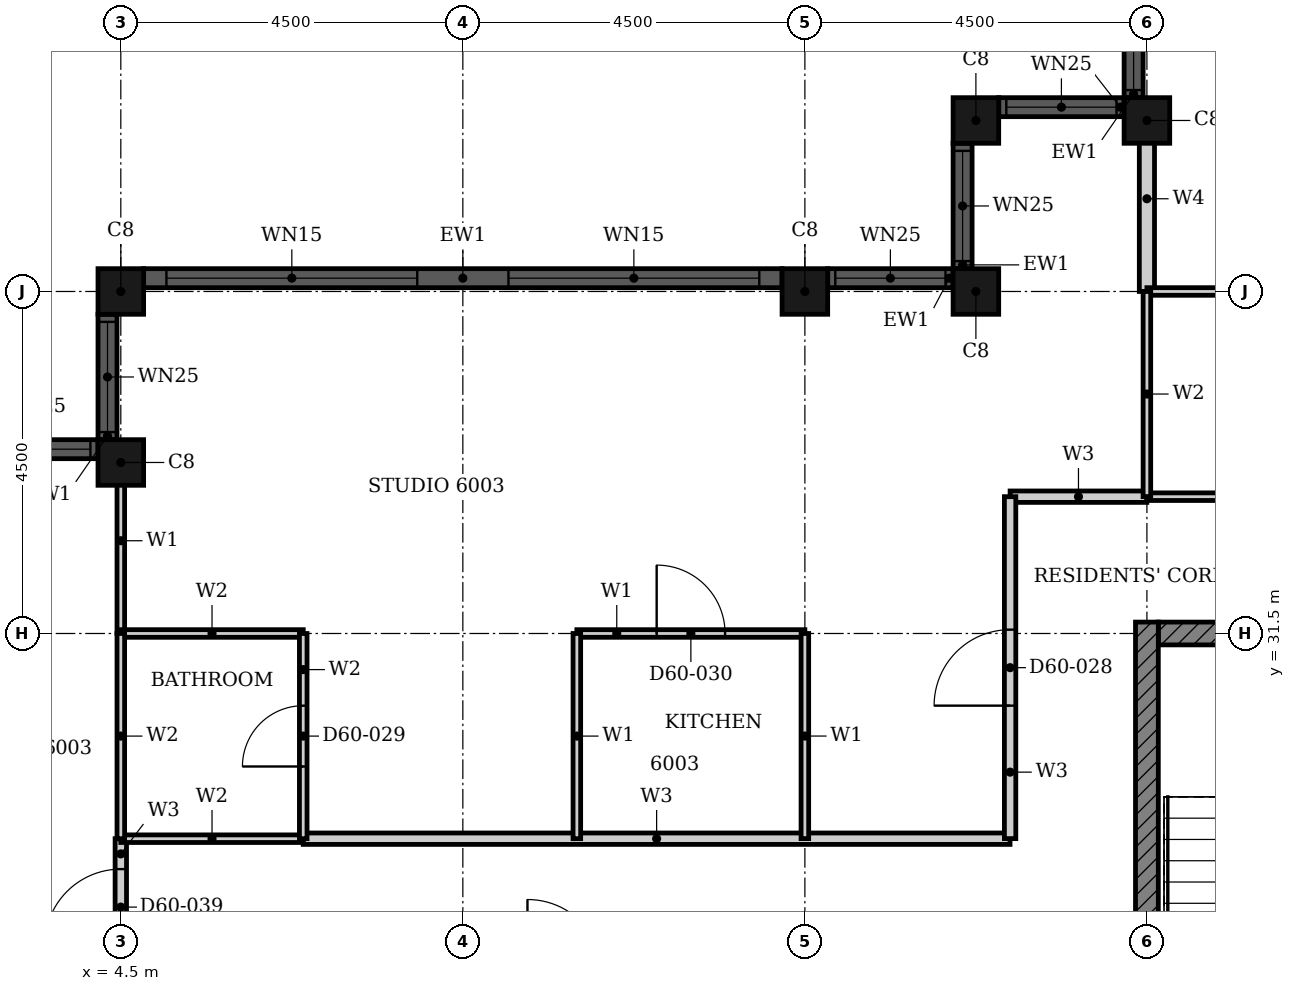
"""IFC4 building model, lengths in metres.
Left out: names, types, materials, properties, quantities, classifications, styles, units other than length and angle.
Written with IfcOpenShell. Run it as: python <this file> out.ifc"""

import sys

from ifc_helpers import new_model, si_unit, direction, frame, frame_2d, origin, origin_2d, place, context, subcontext, project, spatial, rectangle, hollow_rectangle, extrude, element, fill, save


model = new_model("IFC4")
c1 = context("Model", 3, precision=1e-05, world=origin(), true_north=direction((0.0, 1.0)))
c2 = subcontext(c1, "Body", "Model", "MODEL_VIEW")
j1 = project(units=[si_unit("LENGTHUNIT", "METRE"), si_unit("PLANEANGLEUNIT", "RADIAN")], contexts=[c1])
p1 = place(None, origin())
s1 = spatial("IfcSite", under=j1, at=p1, CompositionType="ELEMENT")
p2 = place(p1, origin())
s2 = spatial("IfcBuilding", under=s1, at=p2, CompositionType="ELEMENT")
p3 = place(p2, frame((0.0, 0.0, 237.9)))
s3 = spatial("IfcBuildingStorey", under=s2, at=p3, CompositionType="ELEMENT", Elevation=237.9)
for number, where, z_axis, x_axis in (
    (1, (18.0, 38.25, 0.0), (0.0, 0.0, 1.0), (1.0, 0.0, 0.0)),
    (2, (15.75, 38.25, 0.0), (0.0, 0.0, 1.0), (1.0, 0.0, 0.0)),
    (3, (15.75, 36.0, 0.0), (0.0, 0.0, 1.0), (1.0, 0.0, 0.0)),
    (4, (13.5, 36.0, 0.0), (0.0, 0.0, 1.0), (1.0, 0.0, 0.0)),
    (5, (4.5, 36.0, 0.0), (0.0, 0.0, 1.0), (1.0, 0.0, 0.0)),
    (6, (4.5, 33.75, 0.0), (0.0, 0.0, 1.0), (1.0, 0.0, 0.0)),
):
    element("IfcColumn", number, at=place(p3, frame(where, z_axis=z_axis, x_axis=x_axis)), inside=s3, PredefinedType="COLUMN", context=c2, shape_type="SweptSolid", body=[
        extrude(hollow_rectangle(XDim=0.6, YDim=0.6, WallThickness=0.02, at=origin_2d()), origin(), (0.0, 0.0, 1.0), 3.7),
    ])
p4 = place(p3, frame((17.825, 40.2, 0.0), z_axis=(0.0, 0.0, 1.0), x_axis=(0.0, -1.0, 0.0)))
e7 = element("IfcWall", 7, at=p4, inside=s3, PredefinedType="SOLIDWALL", context=c2, shape_type="SweptSolid", body=[
    extrude(rectangle(XDim=1.65, YDim=0.25, at=frame_2d((0.825, 0.0))), origin(), (0.0, 0.0, 1.0), 3.7),
])
p5 = place(p4, frame((0.1, 0.0, 0.9)))
e8 = element("IfcOpeningElement", 8, at=p5, cuts=e7, PredefinedType="OPENING", context=c2, shape_type="SweptSolid", body=[
    extrude(rectangle(XDim=1.45, YDim=1.85, at=frame_2d((0.725, 0.925))), frame((0.0, 0.135, 0.0), z_axis=(0.0, -1.0, 0.0), x_axis=(1.0, 0.0, 0.0)), (0.0, 0.0, 1.0), 0.27),
])
p6 = place(p3, frame((17.7, 38.425, 0.0), z_axis=(0.0, 0.0, 1.0), x_axis=(-1.0, 0.0, 0.0)))
e9 = element("IfcWall", 9, at=p6, inside=s3, PredefinedType="SOLIDWALL", context=c2, shape_type="SweptSolid", body=[
    extrude(rectangle(XDim=1.65, YDim=0.25, at=frame_2d((0.825, 0.0))), origin(), (0.0, 0.0, 1.0), 3.7),
])
p7 = place(p6, frame((0.1, 0.0, 0.9)))
e10 = element("IfcOpeningElement", 10, at=p7, cuts=e9, PredefinedType="OPENING", context=c2, shape_type="SweptSolid", body=[
    extrude(rectangle(XDim=1.45, YDim=1.85, at=frame_2d((0.725, 0.925))), frame((0.0, 0.135, 0.0), z_axis=(0.0, -1.0, 0.0), x_axis=(1.0, 0.0, 0.0)), (0.0, 0.0, 1.0), 0.27),
])
p8 = place(p3, frame((15.575, 37.95, 0.0), z_axis=(0.0, 0.0, 1.0), x_axis=(0.0, -1.0, 0.0)))
e11 = element("IfcWall", 11, at=p8, inside=s3, PredefinedType="SOLIDWALL", context=c2, shape_type="SweptSolid", body=[
    extrude(rectangle(XDim=1.65, YDim=0.25, at=frame_2d((0.825, 0.0))), origin(), (0.0, 0.0, 1.0), 3.7),
])
p9 = place(p8, frame((0.1, 0.0, 0.9)))
e12 = element("IfcOpeningElement", 12, at=p9, cuts=e11, PredefinedType="OPENING", context=c2, shape_type="SweptSolid", body=[
    extrude(rectangle(XDim=1.45, YDim=1.85, at=frame_2d((0.725, 0.925))), frame((0.0, 0.135, 0.0), z_axis=(0.0, -1.0, 0.0), x_axis=(1.0, 0.0, 0.0)), (0.0, 0.0, 1.0), 0.27),
])
p10 = place(p3, frame((15.45, 36.175, 0.0), z_axis=(0.0, 0.0, 1.0), x_axis=(-1.0, 0.0, 0.0)))
e13 = element("IfcWall", 13, at=p10, inside=s3, PredefinedType="SOLIDWALL", context=c2, shape_type="SweptSolid", body=[
    extrude(rectangle(XDim=1.65, YDim=0.25, at=frame_2d((0.825, 0.0))), origin(), (0.0, 0.0, 1.0), 3.7),
])
p11 = place(p10, frame((0.1, 0.0, 0.9)))
e14 = element("IfcOpeningElement", 14, at=p11, cuts=e13, PredefinedType="OPENING", context=c2, shape_type="SweptSolid", body=[
    extrude(rectangle(XDim=1.45, YDim=1.85, at=frame_2d((0.725, 0.925))), frame((0.0, 0.135, 0.0), z_axis=(0.0, -1.0, 0.0), x_axis=(1.0, 0.0, 0.0)), (0.0, 0.0, 1.0), 0.27),
])
p12 = place(p3, frame((13.2, 36.175, 0.0), z_axis=(0.0, 0.0, 1.0), x_axis=(-1.0, 0.0, 0.0)))
e15 = element("IfcWall", 15, at=p12, inside=s3, PredefinedType="SOLIDWALL", context=c2, shape_type="SweptSolid", body=[
    extrude(rectangle(XDim=8.4, YDim=0.25, at=frame_2d((4.2, 0.0))), origin(), (0.0, 0.0, 1.0), 3.7),
])
p13 = place(p12, frame((0.3, 0.0, 0.45)))
e16 = element("IfcOpeningElement", 16, at=p13, cuts=e15, PredefinedType="OPENING", context=c2, shape_type="SweptSolid", body=[
    extrude(rectangle(XDim=3.3, YDim=2.3, at=frame_2d((1.65, 1.15))), frame((0.0, 0.135, 0.0), z_axis=(0.0, -1.0, 0.0), x_axis=(1.0, 0.0, 0.0)), (0.0, 0.0, 1.0), 0.27),
])
p14 = place(p12, frame((4.8, 0.0, 0.45)))
e17 = element("IfcOpeningElement", 17, at=p14, cuts=e15, PredefinedType="OPENING", context=c2, shape_type="SweptSolid", body=[
    extrude(rectangle(XDim=3.3, YDim=2.3, at=frame_2d((1.65, 1.15))), frame((0.0, 0.135, 0.0), z_axis=(0.0, -1.0, 0.0), x_axis=(1.0, 0.0, 0.0)), (0.0, 0.0, 1.0), 0.27),
])
p15 = place(p3, frame((4.325, 35.7, 0.0), z_axis=(0.0, 0.0, 1.0), x_axis=(0.0, -1.0, 0.0)))
e18 = element("IfcWall", 18, at=p15, inside=s3, PredefinedType="SOLIDWALL", context=c2, shape_type="SweptSolid", body=[
    extrude(rectangle(XDim=1.65, YDim=0.25, at=frame_2d((0.825, 0.0))), origin(), (0.0, 0.0, 1.0), 3.7),
])
p16 = place(p15, frame((0.1, 0.0, 0.9)))
e19 = element("IfcOpeningElement", 19, at=p16, cuts=e18, PredefinedType="OPENING", context=c2, shape_type="SweptSolid", body=[
    extrude(rectangle(XDim=1.45, YDim=1.85, at=frame_2d((0.725, 0.925))), frame((0.0, 0.135, 0.0), z_axis=(0.0, -1.0, 0.0), x_axis=(1.0, 0.0, 0.0)), (0.0, 0.0, 1.0), 0.27),
])
p17 = place(p3, frame((4.2, 33.925, 0.0), z_axis=(0.0, 0.0, 1.0), x_axis=(-1.0, 0.0, 0.0)))
e20 = element("IfcWall", 20, at=p17, inside=s3, PredefinedType="SOLIDWALL", context=c2, shape_type="SweptSolid", body=[
    extrude(rectangle(XDim=1.65, YDim=0.25, at=frame_2d((0.825, 0.0))), origin(), (0.0, 0.0, 1.0), 3.7),
])
p18 = place(p17, frame((0.1, 0.0, 0.9)))
e21 = element("IfcOpeningElement", 21, at=p18, cuts=e20, PredefinedType="OPENING", context=c2, shape_type="SweptSolid", body=[
    extrude(rectangle(XDim=1.45, YDim=1.85, at=frame_2d((0.725, 0.925))), frame((0.0, 0.135, 0.0), z_axis=(0.0, -1.0, 0.0), x_axis=(1.0, 0.0, 0.0)), (0.0, 0.0, 1.0), 0.27),
])
p19 = place(p3, frame((18.15, 31.5, 0.0), z_axis=(0.0, 0.0, 1.0), x_axis=(1.0, 0.0, 0.0)))
e22 = element("IfcWall", 22, at=p19, inside=s3, PredefinedType="SHEAR", context=c2, shape_type="SweptSolid", body=[
    extrude(rectangle(XDim=9.368, YDim=0.3, at=frame_2d((4.684, 0.0))), origin(), (0.0, 0.0, 1.0), 3.4),
])
p20 = place(p19, frame((4.736, 0.0, 0.0)))
e23 = element("IfcOpeningElement", 23, at=p20, cuts=e22, PredefinedType="OPENING", context=c2, shape_type="SweptSolid", body=[
    extrude(rectangle(XDim=1.8, YDim=2.1, at=frame_2d((0.9, 1.05))), frame((0.0, 0.16, 0.0), z_axis=(0.0, -1.0, 0.0), x_axis=(1.0, 0.0, 0.0)), (0.0, 0.0, 1.0), 0.32),
])
p21 = place(p3, frame((18.0, 22.35, 0.0), z_axis=(0.0, 0.0, 1.0), x_axis=(0.0, 1.0, 0.0)))
e24 = element("IfcWall", 24, at=p21, inside=s3, PredefinedType="SHEAR", context=c2, shape_type="SweptSolid", body=[
    extrude(rectangle(XDim=9.3, YDim=0.3, at=frame_2d((4.65, 0.0))), origin(), (0.0, 0.0, 1.0), 3.4),
])
p22 = place(p3, frame((6.9, 28.8, 0.0), z_axis=(0.0, 0.0, 1.0), x_axis=(1.0, 0.0, 0.0)))
e25 = element("IfcWall", 25, at=p22, inside=s3, PredefinedType="PARTITIONING", context=c2, shape_type="SweptSolid", body=[
    extrude(rectangle(XDim=9.299, YDim=0.15, at=frame_2d((4.649, 0.0))), origin(), (0.0, 0.0, 1.0), 3.4),
])
p23 = place(p3, frame((16.2, 33.3, 0.0), z_axis=(0.0, 0.0, 1.0), x_axis=(1.0, 0.0, 0.0)))
e26 = element("IfcWall", 26, at=p23, inside=s3, PredefinedType="PARTITIONING", context=c2, shape_type="SweptSolid", body=[
    extrude(rectangle(XDim=1.799, YDim=0.15, at=frame_2d((0.899, 0.0))), origin(), (0.0, 0.0, 1.0), 3.4),
])
p24 = place(p3, frame((16.2, 28.801, 0.0), z_axis=(0.0, 0.0, 1.0), x_axis=(0.0, 1.0, 0.0)))
e27 = element("IfcWall", 27, at=p24, inside=s3, PredefinedType="PARTITIONING", context=c2, shape_type="SweptSolid", body=[
    extrude(rectangle(XDim=4.499, YDim=0.15, at=frame_2d((2.25, 0.0))), origin(), (0.0, 0.0, 1.0), 3.4),
])
p25 = place(p24, frame((1.75, 0.0, 0.0)))
e28 = element("IfcOpeningElement", 28, at=p25, cuts=e27, PredefinedType="OPENING", context=c2, shape_type="SweptSolid", body=[
    extrude(rectangle(XDim=1.0, YDim=2.2, at=frame_2d((0.5, 1.1))), frame((0.0, 0.085, 0.0), z_axis=(0.0, -1.0, 0.0), x_axis=(1.0, 0.0, 0.0)), (0.0, 0.0, 1.0), 0.17),
])
p26 = place(p3, frame((4.5, 27.0, 0.0), z_axis=(0.0, 0.0, 1.0), x_axis=(0.0, 1.0, 0.0)))
e29 = element("IfcWall", 29, at=p26, inside=s3, PredefinedType="PARTITIONING", context=c2, shape_type="SweptSolid", body=[
    extrude(rectangle(XDim=1.8, YDim=0.15, at=frame_2d((0.9, 0.0))), origin(), (0.0, 0.0, 1.0), 3.4),
])
p27 = place(p26, frame((0.4, 0.0, 0.0)))
e30 = element("IfcOpeningElement", 30, at=p27, cuts=e29, PredefinedType="OPENING", context=c2, shape_type="SweptSolid", body=[
    extrude(rectangle(XDim=1.0, YDim=2.1, at=frame_2d((0.5, 1.05))), frame((0.0, 0.085, 0.0), z_axis=(0.0, -1.0, 0.0), x_axis=(1.0, 0.0, 0.0)), (0.0, 0.0, 1.0), 0.17),
])
p28 = place(p3, frame((10.5, 31.5, 0.0), z_axis=(0.0, 0.0, 1.0), x_axis=(1.0, 0.0, 0.0)))
e31 = element("IfcWall", 31, at=p28, inside=s3, PredefinedType="PARTITIONING", context=c2, shape_type="SweptSolid", body=[
    extrude(rectangle(XDim=3.0, YDim=0.1, at=frame_2d((1.5, 0.0))), origin(), (0.0, 0.0, 1.0), 2.68),
])
p29 = place(p28, frame((1.05, 0.0, 0.0)))
e32 = element("IfcOpeningElement", 32, at=p29, cuts=e31, PredefinedType="OPENING", context=c2, shape_type="SweptSolid", body=[
    extrude(rectangle(XDim=0.9, YDim=2.1, at=frame_2d((0.45, 1.05))), frame((0.0, 0.06, 0.0), z_axis=(0.0, -1.0, 0.0), x_axis=(1.0, 0.0, 0.0)), (0.0, 0.0, 1.0), 0.12),
])
p30 = place(p3, frame((10.5, 28.8, 0.0), z_axis=(0.0, 0.0, 1.0), x_axis=(0.0, 1.0, 0.0)))
e33 = element("IfcWall", 33, at=p30, inside=s3, PredefinedType="PARTITIONING", context=c2, shape_type="SweptSolid", body=[
    extrude(rectangle(XDim=2.7, YDim=0.1, at=frame_2d((1.35, 0.0))), origin(), (0.0, 0.0, 1.0), 3.4),
])
p31 = place(p3, frame((13.5, 28.801, 0.0), z_axis=(0.0, 0.0, 1.0), x_axis=(0.0, 1.0, 0.0)))
e34 = element("IfcWall", 34, at=p31, inside=s3, PredefinedType="PARTITIONING", context=c2, shape_type="SweptSolid", body=[
    extrude(rectangle(XDim=2.699, YDim=0.1, at=frame_2d((1.35, 0.0))), origin(), (0.0, 0.0, 1.0), 2.48),
])
p32 = place(p3, frame((4.5, 31.501, 0.0), z_axis=(0.0, 0.0, 1.0), x_axis=(0.0, 1.0, 0.0)))
e35 = element("IfcWall", 35, at=p32, inside=s3, PredefinedType="PARTITIONING", context=c2, shape_type="SweptSolid", body=[
    extrude(rectangle(XDim=2.439, YDim=0.1, at=frame_2d((1.219, 0.0))), origin(), (0.0, 0.0, 1.0), 3.4),
])
p33 = place(p3, frame((18.0, 36.0, 0.0), z_axis=(0.0, 0.0, 1.0), x_axis=(0.0, 1.0, 0.0)))
e36 = element("IfcWall", 36, at=p33, inside=s3, PredefinedType="PARTITIONING", context=c2, shape_type="SweptSolid", body=[
    extrude(rectangle(XDim=2.44, YDim=0.2, at=frame_2d((1.22, 0.0))), origin(), (0.0, 0.0, 1.0), 3.4),
])
p34 = place(p3, frame((4.5, 28.8, 0.0), z_axis=(0.0, 0.0, 1.0), x_axis=(1.0, 0.0, 0.0)))
e37 = element("IfcWall", 37, at=p34, inside=s3, PredefinedType="PARTITIONING", context=c2, shape_type="SweptSolid", body=[
    extrude(rectangle(XDim=2.4, YDim=0.1, at=frame_2d((1.2, 0.0))), origin(), (0.0, 0.0, 1.0), 3.4),
])
p35 = place(p3, frame((4.5, 31.5, 0.0), z_axis=(0.0, 0.0, 1.0), x_axis=(1.0, 0.0, 0.0)))
e38 = element("IfcWall", 38, at=p35, inside=s3, PredefinedType="PARTITIONING", context=c2, shape_type="SweptSolid", body=[
    extrude(rectangle(XDim=2.4, YDim=0.1, at=frame_2d((1.2, 0.0))), origin(), (0.0, 0.0, 1.0), 2.68),
])
p36 = place(p3, frame((18.0, 33.3, 0.0), z_axis=(0.0, 0.0, 1.0), x_axis=(1.0, 0.0, 0.0)))
e39 = element("IfcWall", 39, at=p36, inside=s3, PredefinedType="PARTITIONING", context=c2, shape_type="SweptSolid", body=[
    extrude(rectangle(XDim=3.6, YDim=0.1, at=frame_2d((1.8, 0.0))), origin(), (0.0, 0.0, 1.0), 3.4),
])
p37 = place(p3, frame((18.0, 36.0, 0.0), z_axis=(0.0, 0.0, 1.0), x_axis=(1.0, 0.0, 0.0)))
e40 = element("IfcWall", 40, at=p37, inside=s3, PredefinedType="PARTITIONING", context=c2, shape_type="SweptSolid", body=[
    extrude(rectangle(XDim=3.6, YDim=0.1, at=frame_2d((1.8, 0.0))), origin(), (0.0, 0.0, 1.0), 3.4),
])
p38 = place(p37, frame((1.4, 0.0, 0.0)))
e41 = element("IfcOpeningElement", 41, at=p38, cuts=e40, PredefinedType="OPENING", context=c2, shape_type="SweptSolid", body=[
    extrude(rectangle(XDim=0.8, YDim=2.1, at=frame_2d((0.4, 1.05))), frame((0.0, 0.06, 0.0), z_axis=(0.0, -1.0, 0.0), x_axis=(1.0, 0.0, 0.0)), (0.0, 0.0, 1.0), 0.12),
])
p39 = place(p3, frame((18.0, 33.301, 0.0), z_axis=(0.0, 0.0, 1.0), x_axis=(0.0, 1.0, 0.0)))
e42 = element("IfcWall", 42, at=p39, inside=s3, PredefinedType="PARTITIONING", context=c2, shape_type="SweptSolid", body=[
    extrude(rectangle(XDim=2.699, YDim=0.1, at=frame_2d((1.35, 0.0))), origin(), (0.0, 0.0, 1.0), 3.4),
])
p40 = place(p3, frame((4.5, 28.8, 0.0), z_axis=(0.0, 0.0, 1.0), x_axis=(0.0, 1.0, 0.0)))
e43 = element("IfcWall", 43, at=p40, inside=s3, PredefinedType="PARTITIONING", context=c2, shape_type="SweptSolid", body=[
    extrude(rectangle(XDim=2.7, YDim=0.1, at=frame_2d((1.35, 0.0))), origin(), (0.0, 0.0, 1.0), 3.4),
])
p41 = place(p3, frame((6.9, 28.8, 0.0), z_axis=(0.0, 0.0, 1.0), x_axis=(0.0, 1.0, 0.0)))
e44 = element("IfcWall", 44, at=p41, inside=s3, PredefinedType="PARTITIONING", context=c2, shape_type="SweptSolid", body=[
    extrude(rectangle(XDim=2.7, YDim=0.1, at=frame_2d((1.35, 0.0))), origin(), (0.0, 0.0, 1.0), 3.4),
])
p42 = place(p41, frame((0.95, 0.0, 0.0)))
e45 = element("IfcOpeningElement", 45, at=p42, cuts=e44, PredefinedType="OPENING", context=c2, shape_type="SweptSolid", body=[
    extrude(rectangle(XDim=0.8, YDim=2.1, at=frame_2d((0.4, 1.05))), frame((0.0, 0.06, 0.0), z_axis=(0.0, -1.0, 0.0), x_axis=(1.0, 0.0, 0.0)), (0.0, 0.0, 1.0), 0.12),
])
p43 = place(p5, origin())
e46 = element("IfcWindow", 46, at=p43, inside=s3, PartitioningType="SINGLE_PANEL", PredefinedType="WINDOW", context=c2, shape_type="SweptSolid", body=[
    extrude(rectangle(XDim=1.45, YDim=1.85, at=frame_2d((0.725, 0.925))), frame((0.0, 0.03, 0.0), z_axis=(0.0, -1.0, 0.0), x_axis=(1.0, 0.0, 0.0)), (0.0, 0.0, 1.0), 0.06),
])
fill(e8, e46)
p44 = place(p7, origin())
e47 = element("IfcWindow", 47, at=p44, inside=s3, PartitioningType="SINGLE_PANEL", PredefinedType="WINDOW", context=c2, shape_type="SweptSolid", body=[
    extrude(rectangle(XDim=1.45, YDim=1.85, at=frame_2d((0.725, 0.925))), frame((0.0, 0.03, 0.0), z_axis=(0.0, -1.0, 0.0), x_axis=(1.0, 0.0, 0.0)), (0.0, 0.0, 1.0), 0.06),
])
fill(e10, e47)
p45 = place(p9, origin())
e48 = element("IfcWindow", 48, at=p45, inside=s3, PartitioningType="SINGLE_PANEL", PredefinedType="WINDOW", context=c2, shape_type="SweptSolid", body=[
    extrude(rectangle(XDim=1.45, YDim=1.85, at=frame_2d((0.725, 0.925))), frame((0.0, 0.03, 0.0), z_axis=(0.0, -1.0, 0.0), x_axis=(1.0, 0.0, 0.0)), (0.0, 0.0, 1.0), 0.06),
])
fill(e12, e48)
p46 = place(p11, origin())
e49 = element("IfcWindow", 49, at=p46, inside=s3, PartitioningType="SINGLE_PANEL", PredefinedType="WINDOW", context=c2, shape_type="SweptSolid", body=[
    extrude(rectangle(XDim=1.45, YDim=1.85, at=frame_2d((0.725, 0.925))), frame((0.0, 0.03, 0.0), z_axis=(0.0, -1.0, 0.0), x_axis=(1.0, 0.0, 0.0)), (0.0, 0.0, 1.0), 0.06),
])
fill(e14, e49)
p47 = place(p13, origin())
e50 = element("IfcWindow", 50, at=p47, inside=s3, PartitioningType="SINGLE_PANEL", PredefinedType="WINDOW", context=c2, shape_type="SweptSolid", body=[
    extrude(rectangle(XDim=3.3, YDim=2.3, at=frame_2d((1.65, 1.15))), frame((0.0, 0.03, 0.0), z_axis=(0.0, -1.0, 0.0), x_axis=(1.0, 0.0, 0.0)), (0.0, 0.0, 1.0), 0.06),
])
fill(e16, e50)
p48 = place(p14, origin())
e51 = element("IfcWindow", 51, at=p48, inside=s3, PartitioningType="SINGLE_PANEL", PredefinedType="WINDOW", context=c2, shape_type="SweptSolid", body=[
    extrude(rectangle(XDim=3.3, YDim=2.3, at=frame_2d((1.65, 1.15))), frame((0.0, 0.03, 0.0), z_axis=(0.0, -1.0, 0.0), x_axis=(1.0, 0.0, 0.0)), (0.0, 0.0, 1.0), 0.06),
])
fill(e17, e51)
p49 = place(p16, origin())
e52 = element("IfcWindow", 52, at=p49, inside=s3, PartitioningType="SINGLE_PANEL", PredefinedType="WINDOW", context=c2, shape_type="SweptSolid", body=[
    extrude(rectangle(XDim=1.45, YDim=1.85, at=frame_2d((0.725, 0.925))), frame((0.0, 0.03, 0.0), z_axis=(0.0, -1.0, 0.0), x_axis=(1.0, 0.0, 0.0)), (0.0, 0.0, 1.0), 0.06),
])
fill(e19, e52)
p50 = place(p18, origin())
e53 = element("IfcWindow", 53, at=p50, inside=s3, PartitioningType="SINGLE_PANEL", PredefinedType="WINDOW", context=c2, shape_type="SweptSolid", body=[
    extrude(rectangle(XDim=1.45, YDim=1.85, at=frame_2d((0.725, 0.925))), frame((0.0, 0.03, 0.0), z_axis=(0.0, -1.0, 0.0), x_axis=(1.0, 0.0, 0.0)), (0.0, 0.0, 1.0), 0.06),
])
fill(e21, e53)
p51 = place(p25, origin())
e54 = element("IfcDoor", 54, at=p51, inside=s3, OperationType="SINGLE_SWING_RIGHT", PredefinedType="DOOR", context=c2, shape_type="SweptSolid", body=[
    extrude(rectangle(XDim=1.0, YDim=2.2, at=frame_2d((0.5, 1.1))), frame((0.0, 0.025, 0.0), z_axis=(0.0, -1.0, 0.0), x_axis=(1.0, 0.0, 0.0)), (0.0, 0.0, 1.0), 0.05),
])
fill(e28, e54)
p52 = place(p42, origin())
e55 = element("IfcDoor", 55, at=p52, inside=s3, OperationType="SINGLE_SWING_RIGHT", PredefinedType="DOOR", context=c2, shape_type="SweptSolid", body=[
    extrude(rectangle(XDim=0.8, YDim=2.1, at=frame_2d((0.4, 1.05))), frame((0.0, 0.025, 0.0), z_axis=(0.0, -1.0, 0.0), x_axis=(1.0, 0.0, 0.0)), (0.0, 0.0, 1.0), 0.05),
])
fill(e45, e55)
p53 = place(p29, origin())
e56 = element("IfcDoor", 56, at=p53, inside=s3, OperationType="SINGLE_SWING_LEFT", PredefinedType="DOOR", context=c2, shape_type="SweptSolid", body=[
    extrude(rectangle(XDim=0.9, YDim=2.1, at=frame_2d((0.45, 1.05))), frame((0.0, 0.025, 0.0), z_axis=(0.0, -1.0, 0.0), x_axis=(1.0, 0.0, 0.0)), (0.0, 0.0, 1.0), 0.05),
])
fill(e32, e56)
p54 = place(p27, origin())
e57 = element("IfcDoor", 57, at=p54, inside=s3, OperationType="SINGLE_SWING_RIGHT", PredefinedType="DOOR", context=c2, shape_type="SweptSolid", body=[
    extrude(rectangle(XDim=1.0, YDim=2.1, at=frame_2d((0.5, 1.05))), frame((0.0, 0.025, 0.0), z_axis=(0.0, -1.0, 0.0), x_axis=(1.0, 0.0, 0.0)), (0.0, 0.0, 1.0), 0.05),
])
fill(e30, e57)
save(model, sys.argv[1])
